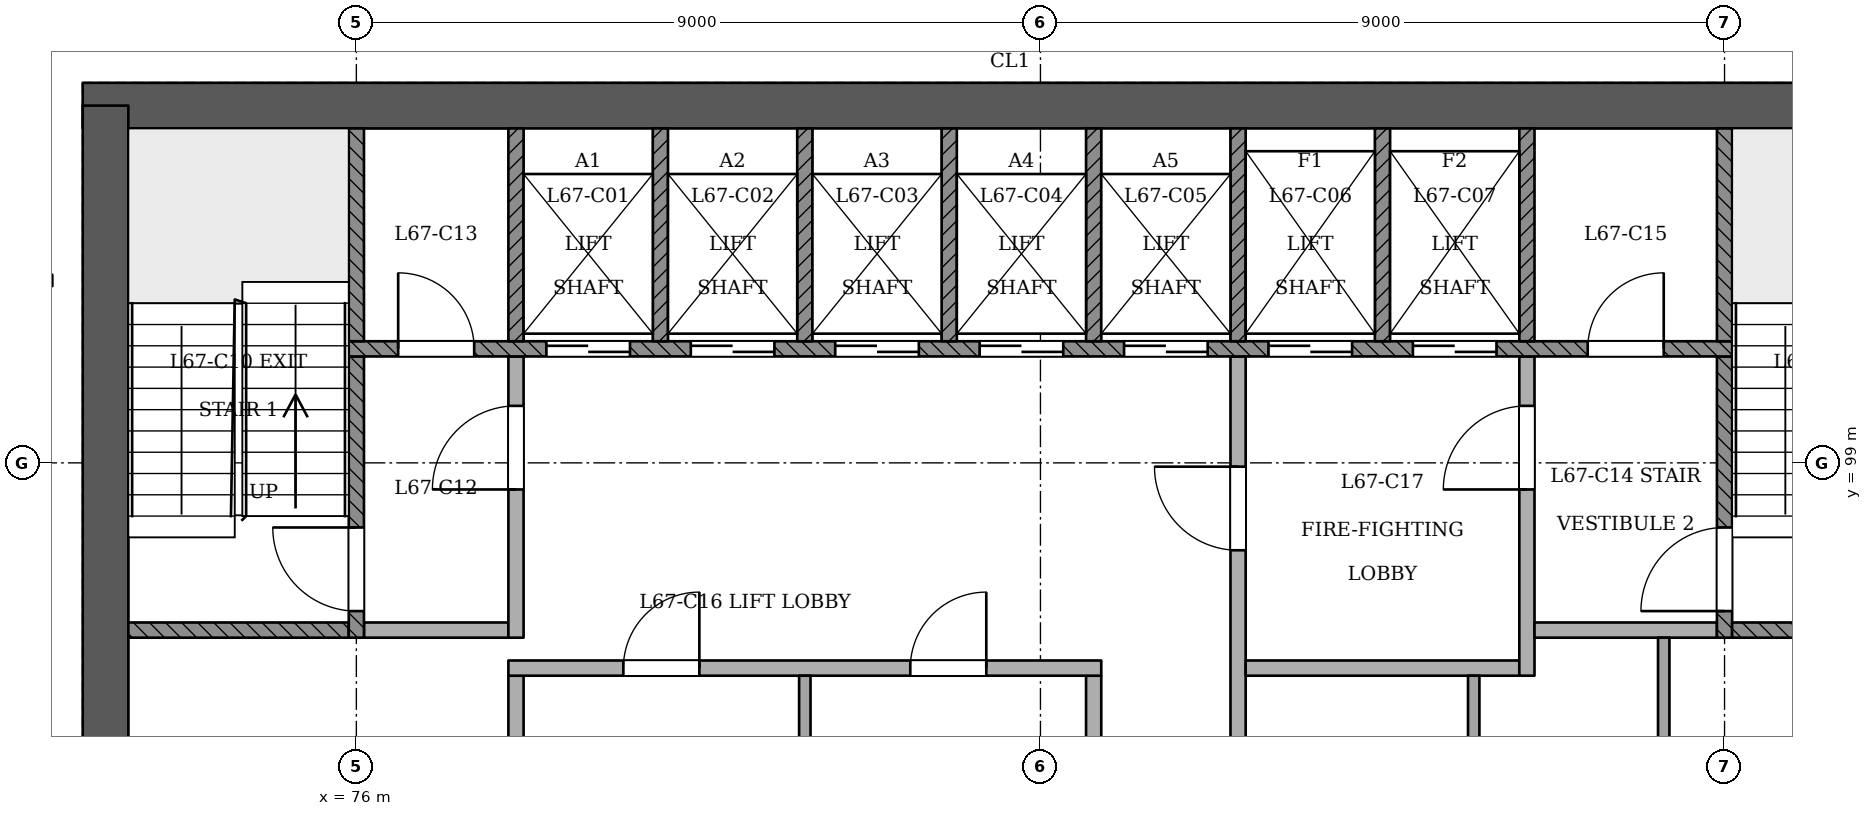
"""IFC4 building model, lengths in metres.
Left out: names, types, materials, properties, quantities, classifications, styles, units other than length and angle.
Written with IfcOpenShell. Run it as: python <this file> out.ifc"""

import sys

from ifc_helpers import new_model, si_unit, direction, frame, frame_2d, origin, place, context, subcontext, project, spatial, rectangle, extrude, element, fill, save


model = new_model("IFC4")
c1 = context("Model", 3, precision=1e-05, world=origin(), true_north=direction((0.0, 1.0)))
c2 = subcontext(c1, "Body", "Model", "MODEL_VIEW")
j1 = project(units=[si_unit("LENGTHUNIT", "METRE"), si_unit("PLANEANGLEUNIT", "RADIAN")], contexts=[c1])
p1 = place(None, origin())
s1 = spatial("IfcSite", under=j1, at=p1, CompositionType="ELEMENT")
p2 = place(p1, origin())
s2 = spatial("IfcBuilding", under=s1, at=p2, CompositionType="ELEMENT")
p3 = place(p2, frame((0.0, 0.0, 260.8)))
s3 = spatial("IfcBuildingStorey", under=s2, at=p3, CompositionType="ELEMENT", Elevation=260.8)
p4 = place(p3, frame((97.3, 103.7, 0.0), z_axis=(0.0, 0.0, 1.0), x_axis=(-1.0, 0.0, 0.0)))
e1 = element("IfcWall", 1, at=p4, inside=s3, PredefinedType="SHEAR", context=c2, shape_type="SweptSolid", body=[
    extrude(rectangle(XDim=24.9, YDim=0.6, at=frame_2d((12.45, 0.0))), origin(), (0.0, 0.0, 1.0), 3.6),
])
p5 = place(p3, frame((72.7, 103.7, 0.0), z_axis=(0.0, 0.0, 1.0), x_axis=(0.0, -1.0, 0.0)))
e2 = element("IfcWall", 2, at=p5, inside=s3, PredefinedType="SHEAR", context=c2, shape_type="SweptSolid", body=[
    extrude(rectangle(XDim=10.9, YDim=0.6, at=frame_2d((5.45, 0.0))), origin(), (0.0, 0.0, 1.0), 3.6),
])
p6 = place(p3, frame((72.0, 101.4, 0.0), z_axis=(0.0, 0.0, 1.0), x_axis=(-1.0, 0.0, 0.0)))
e3 = element("IfcWall", 3, at=p6, inside=s3, PredefinedType="PARTITIONING", context=c2, shape_type="SweptSolid", body=[
    extrude(rectangle(XDim=1.8, YDim=0.15, at=frame_2d((0.9, 0.0))), origin(), (0.0, 0.0, 1.0), 3.2),
])
p7 = place(p6, frame((0.55, 0.0, 0.0)))
e4 = element("IfcOpeningElement", 4, at=p7, cuts=e3, PredefinedType="OPENING", context=c2, shape_type="SweptSolid", body=[
    extrude(rectangle(XDim=1.0, YDim=2.1, at=frame_2d((0.5, 1.05))), frame((0.0, 0.085, 0.0), z_axis=(0.0, -1.0, 0.0), x_axis=(1.0, 0.0, 0.0)), (0.0, 0.0, 1.0), 0.171),
])
p8 = place(p3, frame((78.1, 93.4, 0.0), z_axis=(0.0, 0.0, 1.0), x_axis=(0.0, 1.0, 0.0)))
e5 = element("IfcWall", 5, at=p8, inside=s3, PredefinedType="PARTITIONING", context=c2, shape_type="SweptSolid", body=[
    extrude(rectangle(XDim=2.8, YDim=0.2, at=frame_2d((1.4, 0.0))), origin(), (0.0, 0.0, 1.0), 3.2),
])
p9 = place(p3, frame((81.9, 93.4, 0.0), z_axis=(0.0, 0.0, 1.0), x_axis=(0.0, 1.0, 0.0)))
e6 = element("IfcWall", 6, at=p9, inside=s3, PredefinedType="PARTITIONING", context=c2, shape_type="SweptSolid", body=[
    extrude(rectangle(XDim=2.8, YDim=0.15, at=frame_2d((1.4, 0.0))), origin(), (0.0, 0.0, 1.0), 3.2),
])
p10 = place(p3, frame((85.7, 93.4, 0.0), z_axis=(0.0, 0.0, 1.0), x_axis=(0.0, 1.0, 0.0)))
e7 = element("IfcWall", 7, at=p10, inside=s3, PredefinedType="PARTITIONING", context=c2, shape_type="SweptSolid", body=[
    extrude(rectangle(XDim=2.8, YDim=0.2, at=frame_2d((1.4, 0.0))), origin(), (0.0, 0.0, 1.0), 3.2),
])
p11 = place(p3, frame((87.6, 93.4, 0.0), z_axis=(0.0, 0.0, 1.0), x_axis=(0.0, 1.0, 0.0)))
e8 = element("IfcWall", 8, at=p11, inside=s3, PredefinedType="PARTITIONING", context=c2, shape_type="SweptSolid", body=[
    extrude(rectangle(XDim=7.0, YDim=0.2, at=frame_2d((3.5, 0.0))), origin(), (0.0, 0.0, 1.0), 3.2),
])
p12 = place(p11, frame((4.45, 0.0, 0.0)))
e9 = element("IfcOpeningElement", 9, at=p12, cuts=e8, PredefinedType="OPENING", context=c2, shape_type="SweptSolid", body=[
    extrude(rectangle(XDim=1.1, YDim=2.1, at=frame_2d((0.55, 1.05))), frame((0.0, 0.11, 0.0), z_axis=(0.0, -1.0, 0.0), x_axis=(1.0, 0.0, 0.0)), (0.0, 0.0, 1.0), 0.221),
])
p13 = place(p3, frame((90.7, 93.4, 0.0), z_axis=(0.0, 0.0, 1.0), x_axis=(0.0, 1.0, 0.0)))
e10 = element("IfcWall", 10, at=p13, inside=s3, PredefinedType="PARTITIONING", context=c2, shape_type="SweptSolid", body=[
    extrude(rectangle(XDim=2.8, YDim=0.15, at=frame_2d((1.4, 0.0))), origin(), (0.0, 0.0, 1.0), 3.2),
])
p14 = place(p3, frame((93.2, 93.4, 0.0), z_axis=(0.0, 0.0, 1.0), x_axis=(0.0, 1.0, 0.0)))
e11 = element("IfcWall", 11, at=p14, inside=s3, PredefinedType="PARTITIONING", context=c2, shape_type="SweptSolid", body=[
    extrude(rectangle(XDim=3.3, YDim=0.15, at=frame_2d((1.65, 0.0))), origin(), (0.0, 0.0, 1.0), 3.2),
])
p15 = place(p3, frame((78.0, 96.3, 0.0), z_axis=(0.0, 0.0, 1.0), x_axis=(1.0, 0.0, 0.0)))
e12 = element("IfcWall", 12, at=p15, inside=s3, PredefinedType="PARTITIONING", context=c2, shape_type="SweptSolid", body=[
    extrude(rectangle(XDim=7.8, YDim=0.2, at=frame_2d((3.9, 0.0))), origin(), (0.0, 0.0, 1.0), 3.2),
])
p16 = place(p15, frame((1.512, 0.0, 0.0)))
e13 = element("IfcOpeningElement", 13, at=p16, cuts=e12, PredefinedType="OPENING", context=c2, shape_type="SweptSolid", body=[
    extrude(rectangle(XDim=1.0, YDim=2.1, at=frame_2d((0.5, 1.05))), frame((0.0, 0.11, 0.0), z_axis=(0.0, -1.0, 0.0), x_axis=(1.0, 0.0, 0.0)), (0.0, 0.0, 1.0), 0.221),
])
p17 = place(p15, frame((5.288, 0.0, 0.0)))
e14 = element("IfcOpeningElement", 14, at=p17, cuts=e12, PredefinedType="OPENING", context=c2, shape_type="SweptSolid", body=[
    extrude(rectangle(XDim=1.0, YDim=2.1, at=frame_2d((0.5, 1.05))), frame((0.0, 0.11, 0.0), z_axis=(0.0, -1.0, 0.0), x_axis=(1.0, 0.0, 0.0)), (0.0, 0.0, 1.0), 0.221),
])
p18 = place(p3, frame((87.7, 96.3, 0.0), z_axis=(0.0, 0.0, 1.0), x_axis=(1.0, 0.0, 0.0)))
e15 = element("IfcWall", 15, at=p18, inside=s3, PredefinedType="PARTITIONING", context=c2, shape_type="SweptSolid", body=[
    extrude(rectangle(XDim=3.6, YDim=0.2, at=frame_2d((1.8, 0.0))), origin(), (0.0, 0.0, 1.0), 3.2),
])
p19 = place(p3, frame((91.4, 96.2, 0.0), z_axis=(0.0, 0.0, 1.0), x_axis=(0.0, 1.0, 0.0)))
e16 = element("IfcWall", 16, at=p19, inside=s3, PredefinedType="PARTITIONING", context=c2, shape_type="SweptSolid", body=[
    extrude(rectangle(XDim=4.2, YDim=0.2, at=frame_2d((2.1, 0.0))), origin(), (0.0, 0.0, 1.0), 3.2),
])
p20 = place(p19, frame((2.45, 0.0, 0.0)))
e17 = element("IfcOpeningElement", 17, at=p20, cuts=e16, PredefinedType="OPENING", context=c2, shape_type="SweptSolid", body=[
    extrude(rectangle(XDim=1.1, YDim=2.1, at=frame_2d((0.55, 1.05))), frame((0.0, 0.11, 0.0), z_axis=(0.0, -1.0, 0.0), x_axis=(1.0, 0.0, 0.0)), (0.0, 0.0, 1.0), 0.221),
])
p21 = place(p3, frame((73.0, 96.8, 0.0), z_axis=(0.0, 0.0, 1.0), x_axis=(1.0, 0.0, 0.0)))
e18 = element("IfcWall", 18, at=p21, inside=s3, PredefinedType="SOLIDWALL", context=c2, shape_type="SweptSolid", body=[
    extrude(rectangle(XDim=2.9, YDim=0.2, at=frame_2d((1.45, 0.0))), origin(), (0.0, 0.0, 1.0), 3.2),
])
p22 = place(p3, frame((76.0, 96.7, 0.0), z_axis=(0.0, 0.0, 1.0), x_axis=(0.0, 1.0, 0.0)))
e19 = element("IfcWall", 19, at=p22, inside=s3, PredefinedType="SOLIDWALL", context=c2, shape_type="SweptSolid", body=[
    extrude(rectangle(XDim=3.7, YDim=0.2, at=frame_2d((1.85, 0.0))), origin(), (0.0, 0.0, 1.0), 3.2),
])
p23 = place(p22, frame((0.35, 0.0, 0.0)))
e20 = element("IfcOpeningElement", 20, at=p23, cuts=e19, PredefinedType="OPENING", context=c2, shape_type="SweptSolid", body=[
    extrude(rectangle(XDim=1.1, YDim=2.1, at=frame_2d((0.55, 1.05))), frame((0.0, 0.11, 0.0), z_axis=(0.0, -1.0, 0.0), x_axis=(1.0, 0.0, 0.0)), (0.0, 0.0, 1.0), 0.221),
])
p24 = place(p3, frame((76.1, 96.8, 0.0), z_axis=(0.0, 0.0, 1.0), x_axis=(1.0, 0.0, 0.0)))
e21 = element("IfcWall", 21, at=p24, inside=s3, PredefinedType="PARTITIONING", context=c2, shape_type="SweptSolid", body=[
    extrude(rectangle(XDim=1.9, YDim=0.2, at=frame_2d((0.95, 0.0))), origin(), (0.0, 0.0, 1.0), 3.2),
])
p25 = place(p3, frame((78.1, 96.7, 0.0), z_axis=(0.0, 0.0, 1.0), x_axis=(0.0, 1.0, 0.0)))
e22 = element("IfcWall", 22, at=p25, inside=s3, PredefinedType="PARTITIONING", context=c2, shape_type="SweptSolid", body=[
    extrude(rectangle(XDim=3.7, YDim=0.2, at=frame_2d((1.85, 0.0))), origin(), (0.0, 0.0, 1.0), 3.2),
])
p26 = place(p25, frame((1.95, 0.0, 0.0)))
e23 = element("IfcOpeningElement", 23, at=p26, cuts=e22, PredefinedType="OPENING", context=c2, shape_type="SweptSolid", body=[
    extrude(rectangle(XDim=1.1, YDim=2.1, at=frame_2d((0.55, 1.05))), frame((0.0, 0.11, 0.0), z_axis=(0.0, -1.0, 0.0), x_axis=(1.0, 0.0, 0.0)), (0.0, 0.0, 1.0), 0.221),
])
p27 = place(p3, frame((91.5, 96.8, 0.0), z_axis=(0.0, 0.0, 1.0), x_axis=(1.0, 0.0, 0.0)))
e24 = element("IfcWall", 24, at=p27, inside=s3, PredefinedType="PARTITIONING", context=c2, shape_type="SweptSolid", body=[
    extrude(rectangle(XDim=2.4, YDim=0.2, at=frame_2d((1.2, 0.0))), origin(), (0.0, 0.0, 1.0), 3.2),
])
p28 = place(p3, frame((94.0, 96.7, 0.0), z_axis=(0.0, 0.0, 1.0), x_axis=(0.0, 1.0, 0.0)))
e25 = element("IfcWall", 25, at=p28, inside=s3, PredefinedType="SOLIDWALL", context=c2, shape_type="SweptSolid", body=[
    extrude(rectangle(XDim=3.7, YDim=0.2, at=frame_2d((1.85, 0.0))), origin(), (0.0, 0.0, 1.0), 3.2),
])
p29 = place(p28, frame((0.35, 0.0, 0.0)))
e26 = element("IfcOpeningElement", 26, at=p29, cuts=e25, PredefinedType="OPENING", context=c2, shape_type="SweptSolid", body=[
    extrude(rectangle(XDim=1.1, YDim=2.1, at=frame_2d((0.55, 1.05))), frame((0.0, 0.11, 0.0), z_axis=(0.0, -1.0, 0.0), x_axis=(1.0, 0.0, 0.0)), (0.0, 0.0, 1.0), 0.221),
])
p30 = place(p3, frame((94.1, 96.8, 0.0), z_axis=(0.0, 0.0, 1.0), x_axis=(1.0, 0.0, 0.0)))
e27 = element("IfcWall", 27, at=p30, inside=s3, PredefinedType="SOLIDWALL", context=c2, shape_type="SweptSolid", body=[
    extrude(rectangle(XDim=2.9, YDim=0.2, at=frame_2d((1.45, 0.0))), origin(), (0.0, 0.0, 1.0), 3.2),
])
p31 = place(p3, frame((75.9, 100.5, 0.0), z_axis=(0.0, 0.0, 1.0), x_axis=(1.0, 0.0, 0.0)))
e28 = element("IfcWall", 28, at=p31, inside=s3, PredefinedType="SOLIDWALL", context=c2, shape_type="SweptSolid", body=[
    extrude(rectangle(XDim=18.2, YDim=0.2, at=frame_2d((9.1, 0.0))), origin(), (0.0, 0.0, 1.0), 3.2),
])
p32 = place(p31, frame((2.6, 0.0, 0.0)))
e29 = element("IfcOpeningElement", 29, at=p32, cuts=e28, PredefinedType="OPENING", context=c2, shape_type="SweptSolid", body=[
    extrude(rectangle(XDim=1.1, YDim=2.1, at=frame_2d((0.55, 1.05))), frame((0.0, 0.11, 0.0), z_axis=(0.0, -1.0, 0.0), x_axis=(1.0, 0.0, 0.0)), (0.0, 0.0, 1.0), 0.221),
])
p33 = place(p31, frame((4.5, 0.0, 0.0)))
e30 = element("IfcOpeningElement", 30, at=p33, cuts=e28, PredefinedType="OPENING", context=c2, shape_type="SweptSolid", body=[
    extrude(rectangle(XDim=1.1, YDim=2.1, at=frame_2d((0.55, 1.05))), frame((0.0, 0.11, 0.0), z_axis=(0.0, -1.0, 0.0), x_axis=(1.0, 0.0, 0.0)), (0.0, 0.0, 1.0), 0.221),
])
p34 = place(p31, frame((6.4, 0.0, 0.0)))
e31 = element("IfcOpeningElement", 31, at=p34, cuts=e28, PredefinedType="OPENING", context=c2, shape_type="SweptSolid", body=[
    extrude(rectangle(XDim=1.1, YDim=2.1, at=frame_2d((0.55, 1.05))), frame((0.0, 0.11, 0.0), z_axis=(0.0, -1.0, 0.0), x_axis=(1.0, 0.0, 0.0)), (0.0, 0.0, 1.0), 0.221),
])
p35 = place(p31, frame((8.3, 0.0, 0.0)))
e32 = element("IfcOpeningElement", 32, at=p35, cuts=e28, PredefinedType="OPENING", context=c2, shape_type="SweptSolid", body=[
    extrude(rectangle(XDim=1.1, YDim=2.1, at=frame_2d((0.55, 1.05))), frame((0.0, 0.11, 0.0), z_axis=(0.0, -1.0, 0.0), x_axis=(1.0, 0.0, 0.0)), (0.0, 0.0, 1.0), 0.221),
])
p36 = place(p31, frame((10.2, 0.0, 0.0)))
e33 = element("IfcOpeningElement", 33, at=p36, cuts=e28, PredefinedType="OPENING", context=c2, shape_type="SweptSolid", body=[
    extrude(rectangle(XDim=1.1, YDim=2.1, at=frame_2d((0.55, 1.05))), frame((0.0, 0.11, 0.0), z_axis=(0.0, -1.0, 0.0), x_axis=(1.0, 0.0, 0.0)), (0.0, 0.0, 1.0), 0.221),
])
p37 = place(p31, frame((12.1, 0.0, 0.0)))
e34 = element("IfcOpeningElement", 34, at=p37, cuts=e28, PredefinedType="OPENING", context=c2, shape_type="SweptSolid", body=[
    extrude(rectangle(XDim=1.1, YDim=2.1, at=frame_2d((0.55, 1.05))), frame((0.0, 0.11, 0.0), z_axis=(0.0, -1.0, 0.0), x_axis=(1.0, 0.0, 0.0)), (0.0, 0.0, 1.0), 0.221),
])
p38 = place(p31, frame((14.0, 0.0, 0.0)))
e35 = element("IfcOpeningElement", 35, at=p38, cuts=e28, PredefinedType="OPENING", context=c2, shape_type="SweptSolid", body=[
    extrude(rectangle(XDim=1.1, YDim=2.1, at=frame_2d((0.55, 1.05))), frame((0.0, 0.11, 0.0), z_axis=(0.0, -1.0, 0.0), x_axis=(1.0, 0.0, 0.0)), (0.0, 0.0, 1.0), 0.221),
])
p39 = place(p31, frame((0.65, 0.0, 0.0)))
e36 = element("IfcOpeningElement", 36, at=p39, cuts=e28, PredefinedType="OPENING", context=c2, shape_type="SweptSolid", body=[
    extrude(rectangle(XDim=1.0, YDim=2.1, at=frame_2d((0.5, 1.05))), frame((0.0, 0.11, 0.0), z_axis=(0.0, -1.0, 0.0), x_axis=(1.0, 0.0, 0.0)), (0.0, 0.0, 1.0), 0.221),
])
p40 = place(p31, frame((16.3, 0.0, 0.0)))
e37 = element("IfcOpeningElement", 37, at=p40, cuts=e28, PredefinedType="OPENING", context=c2, shape_type="SweptSolid", body=[
    extrude(rectangle(XDim=1.0, YDim=2.1, at=frame_2d((0.5, 1.05))), frame((0.0, 0.11, 0.0), z_axis=(0.0, -1.0, 0.0), x_axis=(1.0, 0.0, 0.0)), (0.0, 0.0, 1.0), 0.221),
])
for number, where, z_axis, x_axis in (
    (38, (76.0, 100.6, 0.0), (0.0, 0.0, 1.0), (0.0, 1.0, 0.0)),
    (39, (78.1, 100.6, 0.0), (0.0, 0.0, 1.0), (0.0, 1.0, 0.0)),
    (40, (80.0, 100.6, 0.0), (0.0, 0.0, 1.0), (0.0, 1.0, 0.0)),
    (41, (81.9, 100.6, 0.0), (0.0, 0.0, 1.0), (0.0, 1.0, 0.0)),
    (42, (83.8, 100.6, 0.0), (0.0, 0.0, 1.0), (0.0, 1.0, 0.0)),
    (43, (85.7, 100.6, 0.0), (0.0, 0.0, 1.0), (0.0, 1.0, 0.0)),
    (44, (87.6, 100.6, 0.0), (0.0, 0.0, 1.0), (0.0, 1.0, 0.0)),
    (45, (89.5, 100.6, 0.0), (0.0, 0.0, 1.0), (0.0, 1.0, 0.0)),
    (46, (91.4, 100.6, 0.0), (0.0, 0.0, 1.0), (0.0, 1.0, 0.0)),
    (47, (94.0, 100.6, 0.0), (0.0, 0.0, 1.0), (0.0, 1.0, 0.0)),
):
    element("IfcWall", number, at=place(p3, frame(where, z_axis=z_axis, x_axis=x_axis)), inside=s3, PredefinedType="SOLIDWALL", context=c2, shape_type="SweptSolid", body=[
        extrude(rectangle(XDim=2.8, YDim=0.2, at=frame_2d((1.4, 0.0))), origin(), (0.0, 0.0, 1.0), 3.2),
    ])
p41 = place(p32, origin())
e48 = element("IfcDoor", 48, at=p41, inside=s3, OperationType="SLIDING_TO_RIGHT", PredefinedType="NOTDEFINED", context=c2, shape_type="SweptSolid", body=[
    extrude(rectangle(XDim=1.1, YDim=2.1, at=frame_2d((0.55, 1.05))), frame((0.0, 0.025, 0.0), z_axis=(0.0, -1.0, 0.0), x_axis=(1.0, 0.0, 0.0)), (0.0, 0.0, 1.0), 0.05),
])
fill(e29, e48)
p42 = place(p33, origin())
e49 = element("IfcDoor", 49, at=p42, inside=s3, OperationType="SLIDING_TO_LEFT", PredefinedType="NOTDEFINED", context=c2, shape_type="SweptSolid", body=[
    extrude(rectangle(XDim=1.1, YDim=2.1, at=frame_2d((0.55, 1.05))), frame((0.0, 0.025, 0.0), z_axis=(0.0, -1.0, 0.0), x_axis=(1.0, 0.0, 0.0)), (0.0, 0.0, 1.0), 0.05),
])
fill(e30, e49)
p43 = place(p34, origin())
e50 = element("IfcDoor", 50, at=p43, inside=s3, OperationType="SLIDING_TO_RIGHT", PredefinedType="NOTDEFINED", context=c2, shape_type="SweptSolid", body=[
    extrude(rectangle(XDim=1.1, YDim=2.1, at=frame_2d((0.55, 1.05))), frame((0.0, 0.025, 0.0), z_axis=(0.0, -1.0, 0.0), x_axis=(1.0, 0.0, 0.0)), (0.0, 0.0, 1.0), 0.05),
])
fill(e31, e50)
p44 = place(p35, origin())
e51 = element("IfcDoor", 51, at=p44, inside=s3, OperationType="SLIDING_TO_LEFT", PredefinedType="NOTDEFINED", context=c2, shape_type="SweptSolid", body=[
    extrude(rectangle(XDim=1.1, YDim=2.1, at=frame_2d((0.55, 1.05))), frame((0.0, 0.025, 0.0), z_axis=(0.0, -1.0, 0.0), x_axis=(1.0, 0.0, 0.0)), (0.0, 0.0, 1.0), 0.05),
])
fill(e32, e51)
p45 = place(p36, origin())
e52 = element("IfcDoor", 52, at=p45, inside=s3, OperationType="SLIDING_TO_RIGHT", PredefinedType="NOTDEFINED", context=c2, shape_type="SweptSolid", body=[
    extrude(rectangle(XDim=1.1, YDim=2.1, at=frame_2d((0.55, 1.05))), frame((0.0, 0.025, 0.0), z_axis=(0.0, -1.0, 0.0), x_axis=(1.0, 0.0, 0.0)), (0.0, 0.0, 1.0), 0.05),
])
fill(e33, e52)
p46 = place(p37, origin())
e53 = element("IfcDoor", 53, at=p46, inside=s3, OperationType="SLIDING_TO_RIGHT", PredefinedType="NOTDEFINED", context=c2, shape_type="SweptSolid", body=[
    extrude(rectangle(XDim=1.1, YDim=2.1, at=frame_2d((0.55, 1.05))), frame((0.0, 0.025, 0.0), z_axis=(0.0, -1.0, 0.0), x_axis=(1.0, 0.0, 0.0)), (0.0, 0.0, 1.0), 0.05),
])
fill(e34, e53)
p47 = place(p38, origin())
e54 = element("IfcDoor", 54, at=p47, inside=s3, OperationType="SLIDING_TO_LEFT", PredefinedType="NOTDEFINED", context=c2, shape_type="SweptSolid", body=[
    extrude(rectangle(XDim=1.1, YDim=2.1, at=frame_2d((0.55, 1.05))), frame((0.0, 0.025, 0.0), z_axis=(0.0, -1.0, 0.0), x_axis=(1.0, 0.0, 0.0)), (0.0, 0.0, 1.0), 0.05),
])
fill(e35, e54)
p48 = place(p23, origin())
e55 = element("IfcDoor", 55, at=p48, inside=s3, OperationType="SINGLE_SWING_RIGHT", PredefinedType="NOTDEFINED", context=c2, shape_type="SweptSolid", body=[
    extrude(rectangle(XDim=1.1, YDim=2.1, at=frame_2d((0.55, 1.05))), frame((0.0, 0.025, 0.0), z_axis=(0.0, -1.0, 0.0), x_axis=(1.0, 0.0, 0.0)), (0.0, 0.0, 1.0), 0.05),
])
fill(e20, e55)
p49 = place(p29, origin())
e56 = element("IfcDoor", 56, at=p49, inside=s3, OperationType="SINGLE_SWING_LEFT", PredefinedType="NOTDEFINED", context=c2, shape_type="SweptSolid", body=[
    extrude(rectangle(XDim=1.1, YDim=2.1, at=frame_2d((0.55, 1.05))), frame((0.0, 0.025, 0.0), z_axis=(0.0, -1.0, 0.0), x_axis=(1.0, 0.0, 0.0)), (0.0, 0.0, 1.0), 0.05),
])
fill(e26, e56)
p50 = place(p26, origin())
e57 = element("IfcDoor", 57, at=p50, inside=s3, OperationType="SINGLE_SWING_LEFT", PredefinedType="NOTDEFINED", context=c2, shape_type="SweptSolid", body=[
    extrude(rectangle(XDim=1.1, YDim=2.1, at=frame_2d((0.55, 1.05))), frame((0.0, 0.025, 0.0), z_axis=(0.0, -1.0, 0.0), x_axis=(1.0, 0.0, 0.0)), (0.0, 0.0, 1.0), 0.05),
])
fill(e23, e57)
p51 = place(p12, origin())
e58 = element("IfcDoor", 58, at=p51, inside=s3, OperationType="SINGLE_SWING_RIGHT", PredefinedType="NOTDEFINED", context=c2, shape_type="SweptSolid", body=[
    extrude(rectangle(XDim=1.1, YDim=2.1, at=frame_2d((0.55, 1.05))), frame((0.0, 0.025, 0.0), z_axis=(0.0, -1.0, 0.0), x_axis=(1.0, 0.0, 0.0)), (0.0, 0.0, 1.0), 0.05),
])
fill(e9, e58)
p52 = place(p20, origin())
e59 = element("IfcDoor", 59, at=p52, inside=s3, OperationType="SINGLE_SWING_LEFT", PredefinedType="NOTDEFINED", context=c2, shape_type="SweptSolid", body=[
    extrude(rectangle(XDim=1.1, YDim=2.1, at=frame_2d((0.55, 1.05))), frame((0.0, 0.025, 0.0), z_axis=(0.0, -1.0, 0.0), x_axis=(1.0, 0.0, 0.0)), (0.0, 0.0, 1.0), 0.05),
])
fill(e17, e59)
p53 = place(p39, origin())
e60 = element("IfcDoor", 60, at=p53, inside=s3, OperationType="SINGLE_SWING_LEFT", PredefinedType="NOTDEFINED", context=c2, shape_type="SweptSolid", body=[
    extrude(rectangle(XDim=1.0, YDim=2.1, at=frame_2d((0.5, 1.05))), frame((0.0, 0.025, 0.0), z_axis=(0.0, -1.0, 0.0), x_axis=(1.0, 0.0, 0.0)), (0.0, 0.0, 1.0), 0.05),
])
fill(e36, e60)
p54 = place(p40, origin())
e61 = element("IfcDoor", 61, at=p54, inside=s3, OperationType="SINGLE_SWING_RIGHT", PredefinedType="NOTDEFINED", context=c2, shape_type="SweptSolid", body=[
    extrude(rectangle(XDim=1.0, YDim=2.1, at=frame_2d((0.5, 1.05))), frame((0.0, 0.025, 0.0), z_axis=(0.0, -1.0, 0.0), x_axis=(1.0, 0.0, 0.0)), (0.0, 0.0, 1.0), 0.05),
])
fill(e37, e61)
p55 = place(p16, origin())
e62 = element("IfcDoor", 62, at=p55, inside=s3, OperationType="SINGLE_SWING_RIGHT", PredefinedType="NOTDEFINED", context=c2, shape_type="SweptSolid", body=[
    extrude(rectangle(XDim=1.0, YDim=2.1, at=frame_2d((0.5, 1.05))), frame((0.0, 0.025, 0.0), z_axis=(0.0, -1.0, 0.0), x_axis=(1.0, 0.0, 0.0)), (0.0, 0.0, 1.0), 0.05),
])
fill(e13, e62)
p56 = place(p17, origin())
e63 = element("IfcDoor", 63, at=p56, inside=s3, OperationType="SINGLE_SWING_RIGHT", PredefinedType="NOTDEFINED", context=c2, shape_type="SweptSolid", body=[
    extrude(rectangle(XDim=1.0, YDim=2.1, at=frame_2d((0.5, 1.05))), frame((0.0, 0.025, 0.0), z_axis=(0.0, -1.0, 0.0), x_axis=(1.0, 0.0, 0.0)), (0.0, 0.0, 1.0), 0.05),
])
fill(e14, e63)
save(model, sys.argv[1])
